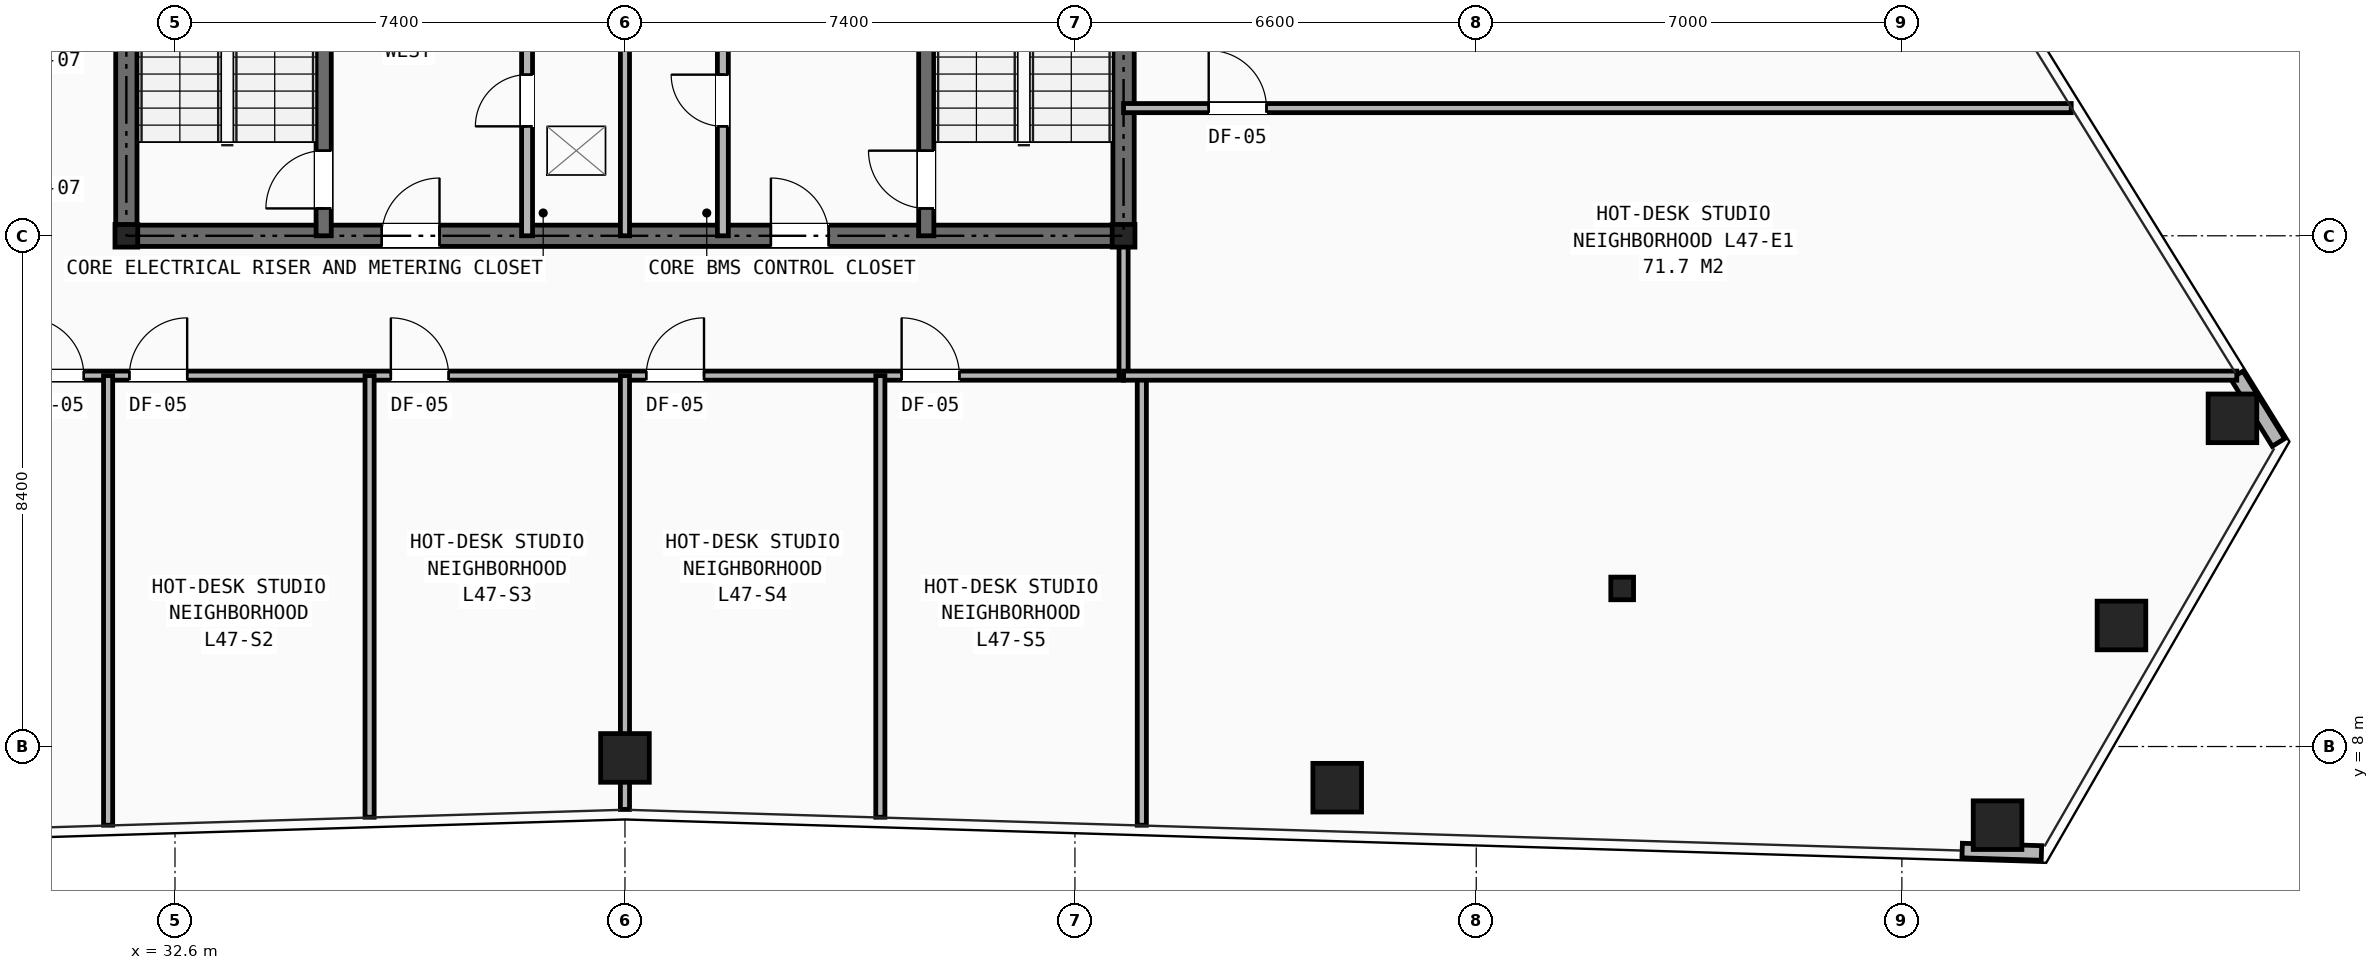
"""IFC4 building model, lengths in metres.
Left out: names, types, materials, properties, quantities, classifications, styles, units other than length and angle.
Written with IfcOpenShell. Run it as: python <this file> out.ifc"""

import sys

from ifc_helpers import new_model, si_unit, direction, frame, frame_2d, origin, origin_2d, place, context, subcontext, project, spatial, rectangle, hollow_rectangle, i_section, extrude, element, fill, save


model = new_model("IFC4")
c1 = context("Model", 3, precision=1e-05, world=origin(), true_north=direction((0.0, 1.0)))
c2 = subcontext(c1, "Body", "Model", "MODEL_VIEW")
j1 = project(units=[si_unit("LENGTHUNIT", "METRE"), si_unit("PLANEANGLEUNIT", "RADIAN")], contexts=[c1])
p1 = place(None, origin())
s1 = spatial("IfcSite", under=j1, at=p1, CompositionType="ELEMENT")
p2 = place(p1, origin())
s2 = spatial("IfcBuilding", under=s1, at=p2, CompositionType="ELEMENT")
p3 = place(p2, frame((0.0, 0.0, 165.45)))
s3 = spatial("IfcBuildingStorey", under=s2, at=p3, CompositionType="ELEMENT", Elevation=165.45)
for number, where, z_axis, x_axis in (
    (1, (31.8, 16.4, 0.0), (0.0, 0.0, 1.0), (1.0, 0.0, 0.0)),
    (2, (48.2, 16.4, 0.0), (0.0, 0.0, 1.0), (1.0, 0.0, 0.0)),
    (3, (56.4, 10.6, 0.0), (0.0, 0.0, 1.0), (1.0, 0.0, 0.0)),
):
    element("IfcColumn", number, at=place(p3, frame(where, z_axis=z_axis, x_axis=x_axis)), inside=s3, PredefinedType="COLUMN", context=c2, shape_type="SweptSolid", body=[
        extrude(i_section(OverallWidth=0.374, OverallDepth=0.372, WebThickness=0.016, FlangeThickness=0.026, at=origin_2d()), origin(), (0.0, 0.0, 1.0), 3.45),
    ])
for number, where, z_axis, x_axis in (
    (4, (40.0, 7.812, 0.0), (0.0, 0.0, 1.0), (1.0, 0.0, 0.0)),
    (5, (51.713, 7.323, 0.0), (0.0, 0.0, 1.0), (1.0, 0.0, 0.0)),
    (6, (62.573, 6.707, 0.0), (0.0, 0.0, 1.0), (1.0, 0.0, 0.0)),
    (7, (64.611, 9.991, 0.0), (0.0, 0.0, 1.0), (1.0, 0.0, 0.0)),
    (8, (66.436, 13.398, 0.0), (0.0, 0.0, 1.0), (1.0, 0.0, 0.0)),
):
    element("IfcColumn", number, at=place(p3, frame(where, z_axis=z_axis, x_axis=x_axis)), inside=s3, PredefinedType="COLUMN", context=c2, shape_type="SweptSolid", body=[
        extrude(hollow_rectangle(XDim=0.8, YDim=0.8, WallThickness=0.055, at=origin_2d()), origin(), (0.0, 0.0, 1.0), 3.45),
    ])
p4 = place(p3, frame((61.991, 6.289, 0.0), z_axis=(0.0, 0.0, 1.0), x_axis=(0.999534631681, -0.030504427067, 0.0)))
e9 = element("IfcWall", 9, at=p4, inside=s3, PredefinedType="SHEAR", context=c2, shape_type="SweptSolid", body=[
    extrude(rectangle(XDim=1.304, YDim=0.24, at=frame_2d((0.652, 0.0))), origin(), (0.0, 0.0, 1.0), 2.583),
])
p5 = place(p3, frame((67.194, 13.001, 0.0), z_axis=(0.0, 0.0, 1.0), x_axis=(-0.526225760999, 0.850344899709, 0.0)))
e10 = element("IfcWall", 10, at=p5, inside=s3, PredefinedType="SHEAR", context=c2, shape_type="SweptSolid", body=[
    extrude(rectangle(XDim=1.305, YDim=0.24, at=frame_2d((0.652, 0.0))), origin(), (0.0, 0.0, 1.0), 2.583),
])
p6 = place(p3, frame((31.8, 16.4, 0.0), z_axis=(0.0, 0.0, 1.0), x_axis=(1.0, 0.0, 0.0)))
e11 = element("IfcWall", 11, at=p6, inside=s3, PredefinedType="SHEAR", context=c2, shape_type="SweptSolid", body=[
    extrude(rectangle(XDim=16.4, YDim=0.35, at=frame_2d((8.2, 0.0))), origin(), (0.0, 0.0, 1.0), 3.21),
])
p7 = place(p6, frame((4.2, 0.0, 0.0)))
e12 = element("IfcOpeningElement", 12, at=p7, cuts=e11, PredefinedType="OPENING", context=c2, shape_type="SweptSolid", body=[
    extrude(rectangle(XDim=0.95, YDim=2.1, at=frame_2d((0.475, 1.05))), frame((0.0, 0.185, 0.0), z_axis=(0.0, -1.0, 0.0), x_axis=(1.0, 0.0, 0.0)), (0.0, 0.0, 1.0), 0.37),
])
p8 = place(p6, frame((10.6, 0.0, 0.0)))
e13 = element("IfcOpeningElement", 13, at=p8, cuts=e11, PredefinedType="OPENING", context=c2, shape_type="SweptSolid", body=[
    extrude(rectangle(XDim=0.95, YDim=2.1, at=frame_2d((0.475, 1.05))), frame((0.0, 0.185, 0.0), z_axis=(0.0, -1.0, 0.0), x_axis=(1.0, 0.0, 0.0)), (0.0, 0.0, 1.0), 0.37),
])
p9 = place(p3, frame((31.8, 16.4, 0.0), z_axis=(0.0, 0.0, 1.0), x_axis=(0.0, 1.0, 0.0)))
e14 = element("IfcWall", 14, at=p9, inside=s3, PredefinedType="SHEAR", context=c2, shape_type="SweptSolid", body=[
    extrude(rectangle(XDim=14.8, YDim=0.35, at=frame_2d((7.4, 0.0))), origin(), (0.0, 0.0, 1.0), 3.21),
])
p10 = place(p9, frame((11.0, 0.0, 0.0)))
e15 = element("IfcOpeningElement", 15, at=p10, cuts=e14, PredefinedType="OPENING", context=c2, shape_type="SweptSolid", body=[
    extrude(rectangle(XDim=1.1, YDim=2.15, at=frame_2d((0.55, 1.075))), frame((0.0, 0.185, 0.0), z_axis=(0.0, -1.0, 0.0), x_axis=(1.0, 0.0, 0.0)), (0.0, 0.0, 1.0), 0.37),
])
p11 = place(p3, frame((48.2, 16.4, 0.0), z_axis=(0.0, 0.0, 1.0), x_axis=(0.0, 1.0, 0.0)))
e16 = element("IfcWall", 16, at=p11, inside=s3, PredefinedType="SHEAR", context=c2, shape_type="SweptSolid", body=[
    extrude(rectangle(XDim=14.8, YDim=0.35, at=frame_2d((7.4, 0.0))), origin(), (0.0, 0.0, 1.0), 3.21),
])
p12 = place(p11, frame((11.0, 0.0, 0.0)))
e17 = element("IfcOpeningElement", 17, at=p12, cuts=e16, PredefinedType="OPENING", context=c2, shape_type="SweptSolid", body=[
    extrude(rectangle(XDim=1.1, YDim=2.15, at=frame_2d((0.55, 1.075))), frame((0.0, 0.185, 0.0), z_axis=(0.0, -1.0, 0.0), x_axis=(1.0, 0.0, 0.0)), (0.0, 0.0, 1.0), 0.37),
])
p13 = place(p3, frame((35.045, 16.4, 0.0), z_axis=(0.0, 0.0, 1.0), x_axis=(0.0, 1.0, 0.0)))
e18 = element("IfcWall", 18, at=p13, inside=s3, PredefinedType="SHEAR", context=c2, shape_type="SweptSolid", body=[
    extrude(rectangle(XDim=8.4, YDim=0.25, at=frame_2d((4.2, 0.0))), origin(), (0.0, 0.0, 1.0), 3.21),
])
p14 = place(p13, frame((0.45, 0.0, 0.0)))
e19 = element("IfcOpeningElement", 19, at=p14, cuts=e18, PredefinedType="OPENING", context=c2, shape_type="SweptSolid", body=[
    extrude(rectangle(XDim=0.95, YDim=2.1, at=frame_2d((0.475, 1.05))), frame((0.0, 0.135, 0.0), z_axis=(0.0, -1.0, 0.0), x_axis=(1.0, 0.0, 0.0)), (0.0, 0.0, 1.0), 0.27),
])
p15 = place(p3, frame((44.955, 16.4, 0.0), z_axis=(0.0, 0.0, 1.0), x_axis=(0.0, 1.0, 0.0)))
e20 = element("IfcWall", 20, at=p15, inside=s3, PredefinedType="SHEAR", context=c2, shape_type="SweptSolid", body=[
    extrude(rectangle(XDim=8.4, YDim=0.25, at=frame_2d((4.2, 0.0))), origin(), (0.0, 0.0, 1.0), 3.21),
])
p16 = place(p15, frame((0.45, 0.0, 0.0)))
e21 = element("IfcOpeningElement", 21, at=p16, cuts=e20, PredefinedType="OPENING", context=c2, shape_type="SweptSolid", body=[
    extrude(rectangle(XDim=0.95, YDim=2.1, at=frame_2d((0.475, 1.05))), frame((0.0, 0.135, 0.0), z_axis=(0.0, -1.0, 0.0), x_axis=(1.0, 0.0, 0.0)), (0.0, 0.0, 1.0), 0.27),
])
p17 = place(p3, frame((38.39, 16.4, 0.0), z_axis=(0.0, 0.0, 1.0), x_axis=(0.0, 1.0, 0.0)))
e22 = element("IfcWall", 22, at=p17, inside=s3, PredefinedType="PARTITIONING", context=c2, shape_type="SweptSolid", body=[
    extrude(rectangle(XDim=8.4, YDim=0.18, at=frame_2d((4.2, 0.0))), origin(), (0.0, 0.0, 1.0), 2.665),
])
p18 = place(p17, frame((1.8, 0.0, 0.0)))
e23 = element("IfcOpeningElement", 23, at=p18, cuts=e22, PredefinedType="OPENING", context=c2, shape_type="SweptSolid", body=[
    extrude(rectangle(XDim=0.85, YDim=2.05, at=frame_2d((0.425, 1.025))), frame((0.0, 0.1, 0.0), z_axis=(0.0, -1.0, 0.0), x_axis=(1.0, 0.0, 0.0)), (0.0, 0.0, 1.0), 0.2),
])
p19 = place(p17, frame((4.35, 0.0, 0.0)))
e24 = element("IfcOpeningElement", 24, at=p19, cuts=e22, PredefinedType="OPENING", context=c2, shape_type="SweptSolid", body=[
    extrude(rectangle(XDim=0.95, YDim=2.1, at=frame_2d((0.475, 1.05))), frame((0.0, 0.1, 0.0), z_axis=(0.0, -1.0, 0.0), x_axis=(1.0, 0.0, 0.0)), (0.0, 0.0, 1.0), 0.2),
])
p20 = place(p3, frame((41.61, 16.4, 0.0), z_axis=(0.0, 0.0, 1.0), x_axis=(0.0, 1.0, 0.0)))
e25 = element("IfcWall", 25, at=p20, inside=s3, PredefinedType="PARTITIONING", context=c2, shape_type="SweptSolid", body=[
    extrude(rectangle(XDim=8.4, YDim=0.18, at=frame_2d((4.2, 0.0))), origin(), (0.0, 0.0, 1.0), 2.665),
])
p21 = place(p20, frame((1.8, 0.0, 0.0)))
e26 = element("IfcOpeningElement", 26, at=p21, cuts=e25, PredefinedType="OPENING", context=c2, shape_type="SweptSolid", body=[
    extrude(rectangle(XDim=0.85, YDim=2.05, at=frame_2d((0.425, 1.025))), frame((0.0, 0.1, 0.0), z_axis=(0.0, -1.0, 0.0), x_axis=(1.0, 0.0, 0.0)), (0.0, 0.0, 1.0), 0.2),
])
p22 = place(p3, frame((40.0, 16.4, 0.0), z_axis=(0.0, 0.0, 1.0), x_axis=(0.0, 1.0, 0.0)))
e27 = element("IfcWall", 27, at=p22, inside=s3, PredefinedType="PARTITIONING", context=c2, shape_type="SweptSolid", body=[
    extrude(rectangle(XDim=3.9, YDim=0.15, at=frame_2d((1.95, 0.0))), origin(), (0.0, 0.0, 1.0), 2.665),
])
p23 = place(p3, frame((29.6, 14.1, 0.0), z_axis=(0.0, 0.0, 1.0), x_axis=(1.0, 0.0, 0.0)))
e28 = element("IfcWall", 28, at=p23, inside=s3, PredefinedType="PARTITIONING", context=c2, shape_type="SweptSolid", body=[
    extrude(rectangle(XDim=18.6, YDim=0.15, at=frame_2d((9.3, 0.0))), origin(), (0.0, 0.0, 1.0), 2.252),
])
p24 = place(p23, frame((0.55, 0.0, 0.0)))
e29 = element("IfcOpeningElement", 29, at=p24, cuts=e28, PredefinedType="OPENING", context=c2, shape_type="SweptSolid", body=[
    extrude(rectangle(XDim=0.95, YDim=2.1, at=frame_2d((0.475, 1.05))), frame((0.0, 0.085, 0.0), z_axis=(0.0, -1.0, 0.0), x_axis=(1.0, 0.0, 0.0)), (0.0, 0.0, 1.0), 0.17),
])
p25 = place(p23, frame((2.25, 0.0, 0.0)))
e30 = element("IfcOpeningElement", 30, at=p25, cuts=e28, PredefinedType="OPENING", context=c2, shape_type="SweptSolid", body=[
    extrude(rectangle(XDim=0.95, YDim=2.1, at=frame_2d((0.475, 1.05))), frame((0.0, 0.085, 0.0), z_axis=(0.0, -1.0, 0.0), x_axis=(1.0, 0.0, 0.0)), (0.0, 0.0, 1.0), 0.17),
])
p26 = place(p23, frame((6.55, 0.0, 0.0)))
e31 = element("IfcOpeningElement", 31, at=p26, cuts=e28, PredefinedType="OPENING", context=c2, shape_type="SweptSolid", body=[
    extrude(rectangle(XDim=0.95, YDim=2.1, at=frame_2d((0.475, 1.05))), frame((0.0, 0.085, 0.0), z_axis=(0.0, -1.0, 0.0), x_axis=(1.0, 0.0, 0.0)), (0.0, 0.0, 1.0), 0.17),
])
p27 = place(p23, frame((10.75, 0.0, 0.0)))
e32 = element("IfcOpeningElement", 32, at=p27, cuts=e28, PredefinedType="OPENING", context=c2, shape_type="SweptSolid", body=[
    extrude(rectangle(XDim=0.95, YDim=2.1, at=frame_2d((0.475, 1.05))), frame((0.0, 0.085, 0.0), z_axis=(0.0, -1.0, 0.0), x_axis=(1.0, 0.0, 0.0)), (0.0, 0.0, 1.0), 0.17),
])
p28 = place(p23, frame((14.95, 0.0, 0.0)))
e33 = element("IfcOpeningElement", 33, at=p28, cuts=e28, PredefinedType="OPENING", context=c2, shape_type="SweptSolid", body=[
    extrude(rectangle(XDim=0.95, YDim=2.1, at=frame_2d((0.475, 1.05))), frame((0.0, 0.085, 0.0), z_axis=(0.0, -1.0, 0.0), x_axis=(1.0, 0.0, 0.0)), (0.0, 0.0, 1.0), 0.17),
])
p29 = place(p3, frame((48.2, 14.1, 0.0), z_axis=(0.0, 0.0, 1.0), x_axis=(0.0, 1.0, 0.0)))
e34 = element("IfcWall", 34, at=p29, inside=s3, PredefinedType="PARTITIONING", context=c2, shape_type="SweptSolid", body=[
    extrude(rectangle(XDim=2.3, YDim=0.15, at=frame_2d((1.15, 0.0))), origin(), (0.0, 0.0, 1.0), 2.665),
])
p30 = place(p3, frame((31.5, 6.706, 0.0), z_axis=(0.0, 0.0, 1.0), x_axis=(0.0, 1.0, 0.0)))
e35 = element("IfcWall", 35, at=p30, inside=s3, PredefinedType="PARTITIONING", context=c2, shape_type="SweptSolid", body=[
    extrude(rectangle(XDim=7.394, YDim=0.15, at=frame_2d((3.697, 0.0))), origin(), (0.0, 0.0, 1.0), 2.589),
])
p31 = place(p3, frame((35.8, 6.837, 0.0), z_axis=(0.0, 0.0, 1.0), x_axis=(0.0, 1.0, 0.0)))
e36 = element("IfcWall", 36, at=p31, inside=s3, PredefinedType="PARTITIONING", context=c2, shape_type="SweptSolid", body=[
    extrude(rectangle(XDim=7.263, YDim=0.15, at=frame_2d((3.631, 0.0))), origin(), (0.0, 0.0, 1.0), 2.252),
])
p32 = place(p3, frame((40.0, 6.965, 0.0), z_axis=(0.0, 0.0, 1.0), x_axis=(0.0, 1.0, 0.0)))
e37 = element("IfcWall", 37, at=p32, inside=s3, PredefinedType="PARTITIONING", context=c2, shape_type="SweptSolid", body=[
    extrude(rectangle(XDim=7.135, YDim=0.15, at=frame_2d((3.567, 0.0))), origin(), (0.0, 0.0, 1.0), 2.252),
])
p33 = place(p3, frame((44.2, 6.837, 0.0), z_axis=(0.0, 0.0, 1.0), x_axis=(0.0, 1.0, 0.0)))
e38 = element("IfcWall", 38, at=p33, inside=s3, PredefinedType="PARTITIONING", context=c2, shape_type="SweptSolid", body=[
    extrude(rectangle(XDim=7.263, YDim=0.15, at=frame_2d((3.631, 0.0))), origin(), (0.0, 0.0, 1.0), 2.589),
])
p34 = place(p3, frame((48.5, 6.706, 0.0), z_axis=(0.0, 0.0, 1.0), x_axis=(0.0, 1.0, 0.0)))
e39 = element("IfcWall", 39, at=p34, inside=s3, PredefinedType="PARTITIONING", context=c2, shape_type="SweptSolid", body=[
    extrude(rectangle(XDim=7.394, YDim=0.15, at=frame_2d((3.697, 0.0))), origin(), (0.0, 0.0, 1.0), 2.589),
])
p35 = place(p3, frame((48.2, 14.1, 0.0), z_axis=(0.0, 0.0, 1.0), x_axis=(1.0, 0.0, 0.0)))
e40 = element("IfcWall", 40, at=p35, inside=s3, PredefinedType="PARTITIONING", context=c2, shape_type="SweptSolid", body=[
    extrude(rectangle(XDim=18.308, YDim=0.15, at=frame_2d((9.154, 0.0))), origin(), (0.0, 0.0, 1.0), 2.589),
])
p36 = place(p3, frame((48.2, 18.5, 0.0), z_axis=(0.0, 0.0, 1.0), x_axis=(1.0, 0.0, 0.0)))
e41 = element("IfcWall", 41, at=p36, inside=s3, PredefinedType="PARTITIONING", context=c2, shape_type="SweptSolid", body=[
    extrude(rectangle(XDim=15.585, YDim=0.15, at=frame_2d((7.792, 0.0))), origin(), (0.0, 0.0, 1.0), 2.589),
])
p37 = place(p36, frame((1.4, 0.0, 0.0)))
e42 = element("IfcOpeningElement", 42, at=p37, cuts=e41, PredefinedType="OPENING", context=c2, shape_type="SweptSolid", body=[
    extrude(rectangle(XDim=0.95, YDim=2.1, at=frame_2d((0.475, 1.05))), frame((0.0, 0.085, 0.0), z_axis=(0.0, -1.0, 0.0), x_axis=(1.0, 0.0, 0.0)), (0.0, 0.0, 1.0), 0.17),
])
p38 = place(p18, origin())
e43 = element("IfcDoor", 43, at=p38, inside=s3, OperationType="SINGLE_SWING_LEFT", PredefinedType="DOOR", context=c2, shape_type="SweptSolid", body=[
    extrude(rectangle(XDim=0.85, YDim=2.05, at=frame_2d((0.425, 1.025))), frame((0.0, 0.025, 0.0), z_axis=(0.0, -1.0, 0.0), x_axis=(1.0, 0.0, 0.0)), (0.0, 0.0, 1.0), 0.05),
])
fill(e23, e43)
p39 = place(p21, origin())
e44 = element("IfcDoor", 44, at=p39, inside=s3, OperationType="SINGLE_SWING_RIGHT", PredefinedType="DOOR", context=c2, shape_type="SweptSolid", body=[
    extrude(rectangle(XDim=0.85, YDim=2.05, at=frame_2d((0.425, 1.025))), frame((0.0, 0.025, 0.0), z_axis=(0.0, -1.0, 0.0), x_axis=(1.0, 0.0, 0.0)), (0.0, 0.0, 1.0), 0.05),
])
fill(e26, e44)
p40 = place(p14, origin())
e45 = element("IfcDoor", 45, at=p40, inside=s3, OperationType="SINGLE_SWING_LEFT", PredefinedType="DOOR", context=c2, shape_type="SweptSolid", body=[
    extrude(rectangle(XDim=0.95, YDim=2.1, at=frame_2d((0.475, 1.05))), frame((0.0, 0.025, 0.0), z_axis=(0.0, -1.0, 0.0), x_axis=(1.0, 0.0, 0.0)), (0.0, 0.0, 1.0), 0.05),
])
fill(e19, e45)
p41 = place(p16, origin())
e46 = element("IfcDoor", 46, at=p41, inside=s3, OperationType="SINGLE_SWING_RIGHT", PredefinedType="DOOR", context=c2, shape_type="SweptSolid", body=[
    extrude(rectangle(XDim=0.95, YDim=2.1, at=frame_2d((0.475, 1.05))), frame((0.0, 0.025, 0.0), z_axis=(0.0, -1.0, 0.0), x_axis=(1.0, 0.0, 0.0)), (0.0, 0.0, 1.0), 0.05),
])
fill(e21, e46)
p42 = place(p7, origin())
e47 = element("IfcDoor", 47, at=p42, inside=s3, OperationType="SINGLE_SWING_RIGHT", PredefinedType="DOOR", context=c2, shape_type="SweptSolid", body=[
    extrude(rectangle(XDim=0.95, YDim=2.1, at=frame_2d((0.475, 1.05))), frame((0.0, 0.025, 0.0), z_axis=(0.0, -1.0, 0.0), x_axis=(1.0, 0.0, 0.0)), (0.0, 0.0, 1.0), 0.05),
])
fill(e12, e47)
p43 = place(p8, origin())
e48 = element("IfcDoor", 48, at=p43, inside=s3, OperationType="SINGLE_SWING_LEFT", PredefinedType="DOOR", context=c2, shape_type="SweptSolid", body=[
    extrude(rectangle(XDim=0.95, YDim=2.1, at=frame_2d((0.475, 1.05))), frame((0.0, 0.025, 0.0), z_axis=(0.0, -1.0, 0.0), x_axis=(1.0, 0.0, 0.0)), (0.0, 0.0, 1.0), 0.05),
])
fill(e13, e48)
p44 = place(p24, origin())
e49 = element("IfcDoor", 49, at=p44, inside=s3, OperationType="SINGLE_SWING_LEFT", PredefinedType="DOOR", context=c2, shape_type="SweptSolid", body=[
    extrude(rectangle(XDim=0.95, YDim=2.1, at=frame_2d((0.475, 1.05))), frame((0.0, 0.025, 0.0), z_axis=(0.0, -1.0, 0.0), x_axis=(1.0, 0.0, 0.0)), (0.0, 0.0, 1.0), 0.05),
])
fill(e29, e49)
p45 = place(p25, origin())
e50 = element("IfcDoor", 50, at=p45, inside=s3, OperationType="SINGLE_SWING_RIGHT", PredefinedType="DOOR", context=c2, shape_type="SweptSolid", body=[
    extrude(rectangle(XDim=0.95, YDim=2.1, at=frame_2d((0.475, 1.05))), frame((0.0, 0.025, 0.0), z_axis=(0.0, -1.0, 0.0), x_axis=(1.0, 0.0, 0.0)), (0.0, 0.0, 1.0), 0.05),
])
fill(e30, e50)
p46 = place(p26, origin())
e51 = element("IfcDoor", 51, at=p46, inside=s3, OperationType="SINGLE_SWING_LEFT", PredefinedType="DOOR", context=c2, shape_type="SweptSolid", body=[
    extrude(rectangle(XDim=0.95, YDim=2.1, at=frame_2d((0.475, 1.05))), frame((0.0, 0.025, 0.0), z_axis=(0.0, -1.0, 0.0), x_axis=(1.0, 0.0, 0.0)), (0.0, 0.0, 1.0), 0.05),
])
fill(e31, e51)
p47 = place(p27, origin())
e52 = element("IfcDoor", 52, at=p47, inside=s3, OperationType="SINGLE_SWING_RIGHT", PredefinedType="DOOR", context=c2, shape_type="SweptSolid", body=[
    extrude(rectangle(XDim=0.95, YDim=2.1, at=frame_2d((0.475, 1.05))), frame((0.0, 0.025, 0.0), z_axis=(0.0, -1.0, 0.0), x_axis=(1.0, 0.0, 0.0)), (0.0, 0.0, 1.0), 0.05),
])
fill(e32, e52)
p48 = place(p28, origin())
e53 = element("IfcDoor", 53, at=p48, inside=s3, OperationType="SINGLE_SWING_LEFT", PredefinedType="DOOR", context=c2, shape_type="SweptSolid", body=[
    extrude(rectangle(XDim=0.95, YDim=2.1, at=frame_2d((0.475, 1.05))), frame((0.0, 0.025, 0.0), z_axis=(0.0, -1.0, 0.0), x_axis=(1.0, 0.0, 0.0)), (0.0, 0.0, 1.0), 0.05),
])
fill(e33, e53)
p49 = place(p37, origin())
e54 = element("IfcDoor", 54, at=p49, inside=s3, OperationType="SINGLE_SWING_LEFT", PredefinedType="DOOR", context=c2, shape_type="SweptSolid", body=[
    extrude(rectangle(XDim=0.95, YDim=2.1, at=frame_2d((0.475, 1.05))), frame((0.0, 0.025, 0.0), z_axis=(0.0, -1.0, 0.0), x_axis=(1.0, 0.0, 0.0)), (0.0, 0.0, 1.0), 0.05),
])
fill(e42, e54)
save(model, sys.argv[1])
